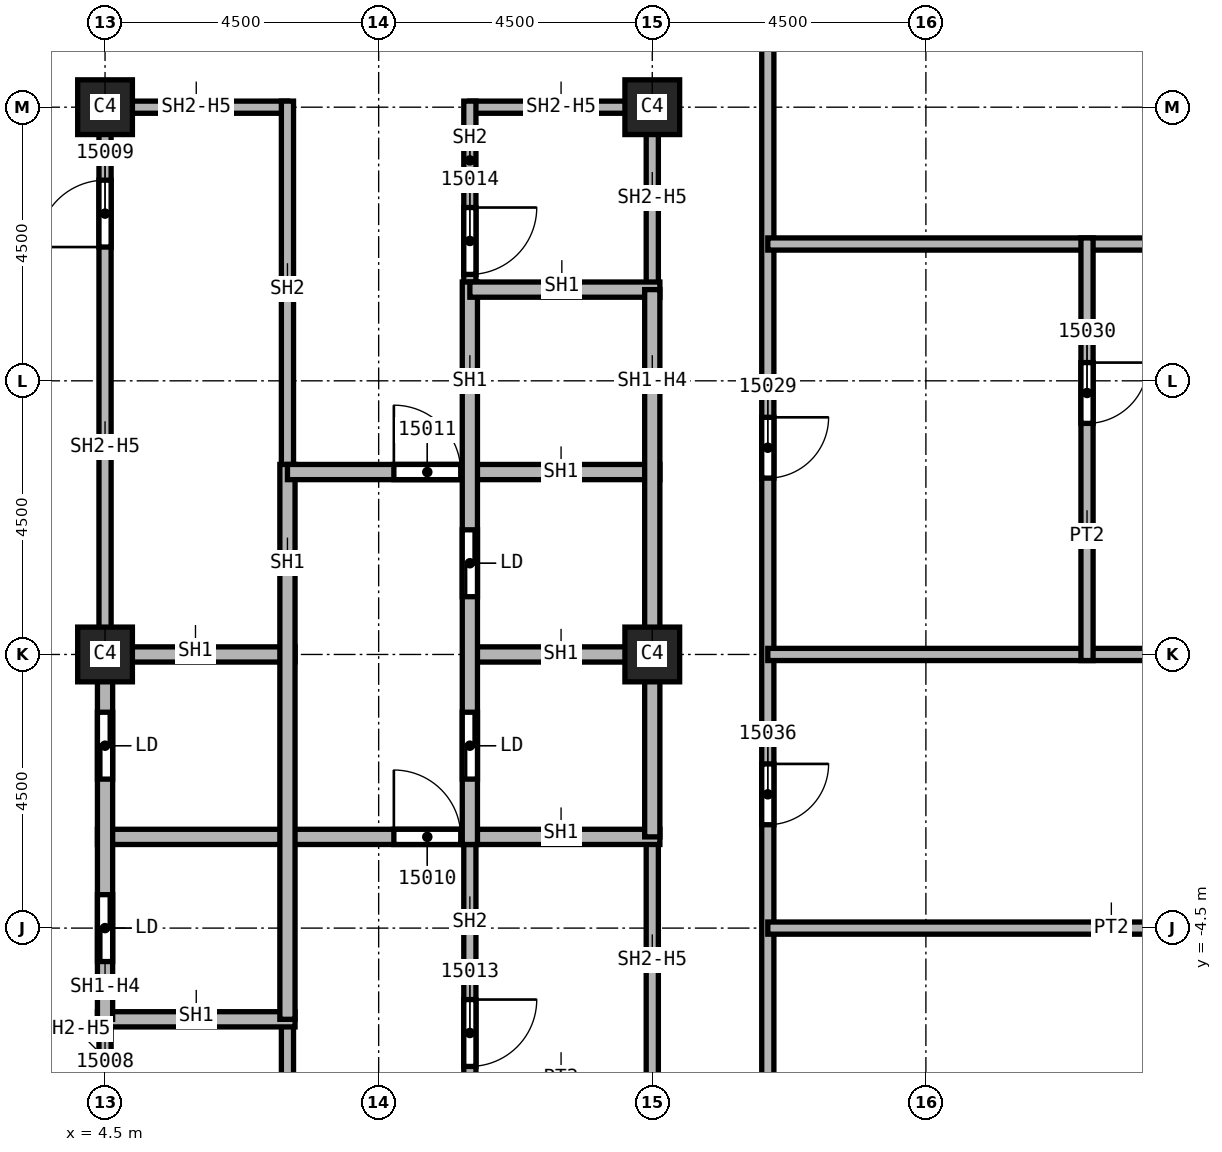
"""IFC4 building model, lengths in metres.
Left out: names, types, materials, properties, quantities, classifications, styles, units other than length and angle.
Written with IfcOpenShell. Run it as: python <this file> out.ifc"""

import sys

from ifc_helpers import new_model, si_unit, direction, frame, frame_2d, origin, origin_2d, place, context, subcontext, project, spatial, rectangle, extrude, element, fill, save


model = new_model("IFC4")
c1 = context("Model", 3, precision=1e-05, world=origin(), true_north=direction((0.0, 1.0)))
c2 = subcontext(c1, "Body", "Model", "MODEL_VIEW")
j1 = project(units=[si_unit("LENGTHUNIT", "METRE"), si_unit("PLANEANGLEUNIT", "RADIAN")], contexts=[c1])
p1 = place(None, origin())
s1 = spatial("IfcSite", under=j1, at=p1, CompositionType="ELEMENT")
p2 = place(p1, origin())
s2 = spatial("IfcBuilding", under=s1, at=p2, CompositionType="ELEMENT")
p3 = place(p2, frame((0.0, 0.0, 232.0)))
s3 = spatial("IfcBuildingStorey", under=s2, at=p3, CompositionType="ELEMENT", Elevation=232.0)
for number, where, z_axis, x_axis in (
    (1, (4.5, 0.0, 0.0), (0.0, 0.0, 1.0), (1.0, 0.0, 0.0)),
    (2, (4.5, 9.0, 0.0), (0.0, 0.0, 1.0), (1.0, 0.0, 0.0)),
    (3, (13.5, 0.0, 0.0), (0.0, 0.0, 1.0), (1.0, 0.0, 0.0)),
    (4, (13.5, 9.0, 0.0), (0.0, 0.0, 1.0), (1.0, 0.0, 0.0)),
):
    element("IfcColumn", number, at=place(p3, frame(where, z_axis=z_axis, x_axis=x_axis)), inside=s3, PredefinedType="COLUMN", context=c2, shape_type="SweptSolid", body=[
        extrude(rectangle(XDim=0.9, YDim=0.9, at=origin_2d()), origin(), (0.0, 0.0, 1.0), 3.6),
    ])
p4 = place(p3, frame((15.4, 22.4, 0.0), z_axis=(0.0, 0.0, 1.0), x_axis=(0.0, -1.0, 0.0)))
e5 = element("IfcWall", 5, at=p4, inside=s3, PredefinedType="PARTITIONING", context=c2, shape_type="SweptSolid", body=[
    extrude(rectangle(XDim=44.8, YDim=0.2, at=frame_2d((22.4, 0.0))), origin(), (0.0, 0.0, 1.0), 3.6),
])
p5 = place(p4, frame((18.5, 0.0, 0.0)))
e6 = element("IfcOpeningElement", 6, at=p5, cuts=e5, PredefinedType="OPENING", context=c2, shape_type="SweptSolid", body=[
    extrude(rectangle(XDim=1.0, YDim=2.1, at=frame_2d((0.5, 1.05))), frame((0.0, 0.1, 0.0), z_axis=(0.0, -1.0, 0.0), x_axis=(1.0, 0.0, 0.0)), (0.0, 0.0, 1.0), 0.2),
])
p6 = place(p4, frame((9.95, 0.0, 0.0)))
e7 = element("IfcOpeningElement", 7, at=p6, cuts=e5, PredefinedType="OPENING", context=c2, shape_type="SweptSolid", body=[
    extrude(rectangle(XDim=1.0, YDim=2.1, at=frame_2d((0.5, 1.05))), frame((0.0, 0.1, 0.0), z_axis=(0.0, -1.0, 0.0), x_axis=(1.0, 0.0, 0.0)), (0.0, 0.0, 1.0), 0.2),
])
p7 = place(p4, frame((1.3, 0.0, 0.0)))
e8 = element("IfcOpeningElement", 8, at=p7, cuts=e5, PredefinedType="OPENING", context=c2, shape_type="SweptSolid", body=[
    extrude(rectangle(XDim=1.0, YDim=2.1, at=frame_2d((0.5, 1.05))), frame((0.0, 0.1, 0.0), z_axis=(0.0, -1.0, 0.0), x_axis=(1.0, 0.0, 0.0)), (0.0, 0.0, 1.0), 0.2),
])
p8 = place(p4, frame((43.55, 0.0, 0.0)))
e9 = element("IfcOpeningElement", 9, at=p8, cuts=e5, PredefinedType="OPENING", context=c2, shape_type="SweptSolid", body=[
    extrude(rectangle(XDim=1.0, YDim=2.1, at=frame_2d((0.5, 1.05))), frame((0.0, 0.1, 0.0), z_axis=(0.0, -1.0, 0.0), x_axis=(1.0, 0.0, 0.0)), (0.0, 0.0, 1.0), 0.2),
])
p9 = place(p4, frame((38.3, 0.0, 0.0)))
e10 = element("IfcOpeningElement", 10, at=p9, cuts=e5, PredefinedType="OPENING", context=c2, shape_type="SweptSolid", body=[
    extrude(rectangle(XDim=1.0, YDim=2.1, at=frame_2d((0.5, 1.05))), frame((0.0, 0.1, 0.0), z_axis=(0.0, -1.0, 0.0), x_axis=(1.0, 0.0, 0.0)), (0.0, 0.0, 1.0), 0.2),
])
p10 = place(p4, frame((30.65, 0.0, 0.0)))
e11 = element("IfcOpeningElement", 11, at=p10, cuts=e5, PredefinedType="OPENING", context=c2, shape_type="SweptSolid", body=[
    extrude(rectangle(XDim=1.0, YDim=2.1, at=frame_2d((0.5, 1.05))), frame((0.0, 0.1, 0.0), z_axis=(0.0, -1.0, 0.0), x_axis=(1.0, 0.0, 0.0)), (0.0, 0.0, 1.0), 0.2),
])
p11 = place(p4, frame((24.2, 0.0, 0.0)))
e12 = element("IfcOpeningElement", 12, at=p11, cuts=e5, PredefinedType="OPENING", context=c2, shape_type="SweptSolid", body=[
    extrude(rectangle(XDim=1.0, YDim=2.1, at=frame_2d((0.5, 1.05))), frame((0.0, 0.1, 0.0), z_axis=(0.0, -1.0, 0.0), x_axis=(1.0, 0.0, 0.0)), (0.0, 0.0, 1.0), 0.2),
])
for number, where, z_axis, x_axis in (
    (13, (15.4, -4.5, 0.0), (0.0, 0.0, 1.0), (1.0, 0.0, 0.0)),
    (14, (15.4, 6.75, 0.0), (0.0, 0.0, 1.0), (1.0, 0.0, 0.0)),
):
    element("IfcWall", number, at=place(p3, frame(where, z_axis=z_axis, x_axis=x_axis)), inside=s3, PredefinedType="PARTITIONING", context=c2, shape_type="SweptSolid", body=[
        extrude(rectangle(XDim=11.2, YDim=0.2, at=frame_2d((5.6, 0.0))), origin(), (0.0, 0.0, 1.0), 3.6),
    ])
p12 = place(p3, frame((26.5, 0.0, 0.0), z_axis=(0.0, 0.0, 1.0), x_axis=(-1.0, 0.0, 0.0)))
e15 = element("IfcWall", 15, at=p12, inside=s3, PredefinedType="PARTITIONING", context=c2, shape_type="SweptSolid", body=[
    extrude(rectangle(XDim=11.1, YDim=0.2, at=frame_2d((5.55, 0.0))), origin(), (0.0, 0.0, 1.0), 3.6),
])
p13 = place(p3, frame((20.65, 6.85, 0.0), z_axis=(0.0, 0.0, 1.0), x_axis=(0.0, -1.0, 0.0)))
e16 = element("IfcWall", 16, at=p13, inside=s3, PredefinedType="PARTITIONING", context=c2, shape_type="SweptSolid", body=[
    extrude(rectangle(XDim=6.95, YDim=0.2, at=frame_2d((3.475, 0.0))), origin(), (0.0, 0.0, 1.0), 3.6),
])
p14 = place(p13, frame((2.05, 0.0, 0.0)))
e17 = element("IfcOpeningElement", 17, at=p14, cuts=e16, PredefinedType="OPENING", context=c2, shape_type="SweptSolid", body=[
    extrude(rectangle(XDim=1.0, YDim=2.1, at=frame_2d((0.5, 1.05))), frame((0.0, 0.1, 0.0), z_axis=(0.0, -1.0, 0.0), x_axis=(1.0, 0.0, 0.0)), (0.0, 0.0, 1.0), 0.2),
])
p15 = place(p3, frame((4.5, -9.1, 0.0), z_axis=(0.0, 0.0, 1.0), x_axis=(0.0, 1.0, 0.0)))
e18 = element("IfcWall", 18, at=p15, inside=s3, PredefinedType="SOLIDWALL", context=c2, shape_type="SweptSolid", body=[
    extrude(rectangle(XDim=3.1, YDim=0.2, at=frame_2d((1.55, 0.0))), origin(), (0.0, 0.0, 1.0), 2.838),
])
p16 = place(p15, frame((0.85, 0.0, 0.0)))
e19 = element("IfcOpeningElement", 19, at=p16, cuts=e18, PredefinedType="OPENING", context=c2, shape_type="SweptSolid", body=[
    extrude(rectangle(XDim=1.1, YDim=2.1, at=frame_2d((0.55, 1.05))), frame((0.0, 0.1, 0.0), z_axis=(0.0, -1.0, 0.0), x_axis=(1.0, 0.0, 0.0)), (0.0, 0.0, 1.0), 0.2),
])
p17 = place(p3, frame((4.5, 0.0, 0.0), z_axis=(0.0, 0.0, 1.0), x_axis=(0.0, 1.0, 0.0)))
e20 = element("IfcWall", 20, at=p17, inside=s3, PredefinedType="SOLIDWALL", context=c2, shape_type="SweptSolid", body=[
    extrude(rectangle(XDim=9.1, YDim=0.2, at=frame_2d((4.55, 0.0))), origin(), (0.0, 0.0, 1.0), 2.838),
])
p18 = place(p17, frame((6.7, 0.0, 0.0)))
e21 = element("IfcOpeningElement", 21, at=p18, cuts=e20, PredefinedType="OPENING", context=c2, shape_type="SweptSolid", body=[
    extrude(rectangle(XDim=1.1, YDim=2.1, at=frame_2d((0.55, 1.05))), frame((0.0, 0.1, 0.0), z_axis=(0.0, -1.0, 0.0), x_axis=(1.0, 0.0, 0.0)), (0.0, 0.0, 1.0), 0.2),
])
p19 = place(p3, frame((4.5, 9.0, 0.0), z_axis=(0.0, 0.0, 1.0), x_axis=(1.0, 0.0, 0.0)))
e22 = element("IfcWall", 22, at=p19, inside=s3, PredefinedType="SOLIDWALL", context=c2, shape_type="SweptSolid", body=[
    extrude(rectangle(XDim=3.0, YDim=0.2, at=frame_2d((1.5, 0.0))), origin(), (0.0, 0.0, 1.0), 2.838),
])
p20 = place(p3, frame((7.5, -6.0, 0.0), z_axis=(0.0, 0.0, 1.0), x_axis=(0.0, -1.0, 0.0)))
e23 = element("IfcWall", 23, at=p20, inside=s3, PredefinedType="SOLIDWALL", context=c2, shape_type="SweptSolid", body=[
    extrude(rectangle(XDim=3.1, YDim=0.2, at=frame_2d((1.55, 0.0))), origin(), (0.0, 0.0, 1.0), 3.6),
])
p21 = place(p3, frame((7.5, 9.1, 0.0), z_axis=(0.0, 0.0, 1.0), x_axis=(0.0, -1.0, 0.0)))
e24 = element("IfcWall", 24, at=p21, inside=s3, PredefinedType="SOLIDWALL", context=c2, shape_type="SweptSolid", body=[
    extrude(rectangle(XDim=6.225, YDim=0.2, at=frame_2d((3.113, 0.0))), origin(), (0.0, 0.0, 1.0), 3.6),
])
p22 = place(p3, frame((10.5, -2.875, 0.0), z_axis=(0.0, 0.0, 1.0), x_axis=(0.0, -1.0, 0.0)))
e25 = element("IfcWall", 25, at=p22, inside=s3, PredefinedType="SOLIDWALL", context=c2, shape_type="SweptSolid", body=[
    extrude(rectangle(XDim=4.2, YDim=0.2, at=frame_2d((2.1, 0.0))), origin(), (0.0, 0.0, 1.0), 3.6),
])
p23 = place(p22, frame((2.8, 0.0, 0.0)))
e26 = element("IfcOpeningElement", 26, at=p23, cuts=e25, PredefinedType="OPENING", context=c2, shape_type="SweptSolid", body=[
    extrude(rectangle(XDim=1.1, YDim=2.1, at=frame_2d((0.55, 1.05))), frame((0.0, 0.1, 0.0), z_axis=(0.0, -1.0, 0.0), x_axis=(1.0, 0.0, 0.0)), (0.0, 0.0, 1.0), 0.2),
])
p24 = place(p3, frame((10.5, 9.0, 0.0), z_axis=(0.0, 0.0, 1.0), x_axis=(1.0, 0.0, 0.0)))
e27 = element("IfcWall", 27, at=p24, inside=s3, PredefinedType="SOLIDWALL", context=c2, shape_type="SweptSolid", body=[
    extrude(rectangle(XDim=3.0, YDim=0.2, at=frame_2d((1.5, 0.0))), origin(), (0.0, 0.0, 1.0), 2.838),
])
p25 = place(p3, frame((10.5, 9.1, 0.0), z_axis=(0.0, 0.0, 1.0), x_axis=(0.0, -1.0, 0.0)))
e28 = element("IfcWall", 28, at=p25, inside=s3, PredefinedType="SOLIDWALL", context=c2, shape_type="SweptSolid", body=[
    extrude(rectangle(XDim=3.225, YDim=0.2, at=frame_2d((1.613, 0.0))), origin(), (0.0, 0.0, 1.0), 3.6),
])
p26 = place(p25, frame((1.75, 0.0, 0.0)))
e29 = element("IfcOpeningElement", 29, at=p26, cuts=e28, PredefinedType="OPENING", context=c2, shape_type="SweptSolid", body=[
    extrude(rectangle(XDim=1.1, YDim=2.1, at=frame_2d((0.55, 1.05))), frame((0.0, 0.1, 0.0), z_axis=(0.0, -1.0, 0.0), x_axis=(1.0, 0.0, 0.0)), (0.0, 0.0, 1.0), 0.2),
])
p27 = place(p3, frame((13.5, -3.0, 0.0), z_axis=(0.0, 0.0, 1.0), x_axis=(0.0, -1.0, 0.0)))
e30 = element("IfcWall", 30, at=p27, inside=s3, PredefinedType="SOLIDWALL", context=c2, shape_type="SweptSolid", body=[
    extrude(rectangle(XDim=4.0, YDim=0.2, at=frame_2d((2.0, 0.0))), origin(), (0.0, 0.0, 1.0), 2.838),
])
p28 = place(p3, frame((13.5, 9.1, 0.0), z_axis=(0.0, 0.0, 1.0), x_axis=(0.0, -1.0, 0.0)))
e31 = element("IfcWall", 31, at=p28, inside=s3, PredefinedType="SOLIDWALL", context=c2, shape_type="SweptSolid", body=[
    extrude(rectangle(XDim=3.1, YDim=0.2, at=frame_2d((1.55, 0.0))), origin(), (0.0, 0.0, 1.0), 2.838),
])
p29 = place(p3, frame((4.375, -6.0, 0.0), z_axis=(0.0, 0.0, 1.0), x_axis=(1.0, 0.0, 0.0)))
e32 = element("IfcWall", 32, at=p29, inside=s3, PredefinedType="SOLIDWALL", context=c2, shape_type="SweptSolid", body=[
    extrude(rectangle(XDim=3.25, YDim=0.25, at=frame_2d((1.625, 0.0))), origin(), (0.0, 0.0, 1.0), 3.6),
])
p30 = place(p3, frame((4.375, -3.0, 0.0), z_axis=(0.0, 0.0, 1.0), x_axis=(1.0, 0.0, 0.0)))
e33 = element("IfcWall", 33, at=p30, inside=s3, PredefinedType="SOLIDWALL", context=c2, shape_type="SweptSolid", body=[
    extrude(rectangle(XDim=9.25, YDim=0.25, at=frame_2d((4.625, 0.0))), origin(), (0.0, 0.0, 1.0), 3.6),
])
p31 = place(p30, frame((4.875, 0.0, 0.0)))
e34 = element("IfcOpeningElement", 34, at=p31, cuts=e33, PredefinedType="OPENING", context=c2, shape_type="SweptSolid", body=[
    extrude(rectangle(XDim=1.1, YDim=2.1, at=frame_2d((0.55, 1.05))), frame((0.0, 0.125, 0.0), z_axis=(0.0, -1.0, 0.0), x_axis=(1.0, 0.0, 0.0)), (0.0, 0.0, 1.0), 0.25),
])
p32 = place(p3, frame((4.375, 0.0, 0.0), z_axis=(0.0, 0.0, 1.0), x_axis=(1.0, 0.0, 0.0)))
e35 = element("IfcWall", 35, at=p32, inside=s3, PredefinedType="SOLIDWALL", context=c2, shape_type="SweptSolid", body=[
    extrude(rectangle(XDim=3.25, YDim=0.25, at=frame_2d((1.625, 0.0))), origin(), (0.0, 0.0, 1.0), 3.6),
])
p33 = place(p3, frame((4.5, -6.0, 0.0), z_axis=(0.0, 0.0, 1.0), x_axis=(0.0, 1.0, 0.0)))
e36 = element("IfcWall", 36, at=p33, inside=s3, PredefinedType="SOLIDWALL", context=c2, shape_type="SweptSolid", body=[
    extrude(rectangle(XDim=6.0, YDim=0.25, at=frame_2d((3.0, 0.0))), origin(), (0.0, 0.0, 1.0), 2.838),
])
p34 = place(p33, frame((0.95, 0.0, 0.0)))
e37 = element("IfcOpeningElement", 37, at=p34, cuts=e36, PredefinedType="OPENING", context=c2, shape_type="SweptSolid", body=[
    extrude(rectangle(XDim=1.1, YDim=2.1, at=frame_2d((0.55, 1.05))), frame((0.0, 0.125, 0.0), z_axis=(0.0, -1.0, 0.0), x_axis=(1.0, 0.0, 0.0)), (0.0, 0.0, 1.0), 0.25),
])
p35 = place(p33, frame((3.95, 0.0, 0.0)))
e38 = element("IfcOpeningElement", 38, at=p35, cuts=e36, PredefinedType="OPENING", context=c2, shape_type="SweptSolid", body=[
    extrude(rectangle(XDim=1.1, YDim=2.1, at=frame_2d((0.55, 1.05))), frame((0.0, 0.125, 0.0), z_axis=(0.0, -1.0, 0.0), x_axis=(1.0, 0.0, 0.0)), (0.0, 0.0, 1.0), 0.25),
])
p36 = place(p3, frame((7.5, 3.125, 0.0), z_axis=(0.0, 0.0, 1.0), x_axis=(0.0, -1.0, 0.0)))
e39 = element("IfcWall", 39, at=p36, inside=s3, PredefinedType="SOLIDWALL", context=c2, shape_type="SweptSolid", body=[
    extrude(rectangle(XDim=9.125, YDim=0.25, at=frame_2d((4.562, 0.0))), origin(), (0.0, 0.0, 1.0), 3.6),
])
p37 = place(p3, frame((7.5, 3.0, 0.0), z_axis=(0.0, 0.0, 1.0), x_axis=(1.0, 0.0, 0.0)))
e40 = element("IfcWall", 40, at=p37, inside=s3, PredefinedType="SOLIDWALL", context=c2, shape_type="SweptSolid", body=[
    extrude(rectangle(XDim=6.125, YDim=0.25, at=frame_2d((3.062, 0.0))), origin(), (0.0, 0.0, 1.0), 3.6),
])
p38 = place(p37, frame((1.75, 0.0, 0.0)))
e41 = element("IfcOpeningElement", 41, at=p38, cuts=e40, PredefinedType="OPENING", context=c2, shape_type="SweptSolid", body=[
    extrude(rectangle(XDim=1.1, YDim=2.1, at=frame_2d((0.55, 1.05))), frame((0.0, 0.125, 0.0), z_axis=(0.0, -1.0, 0.0), x_axis=(1.0, 0.0, 0.0)), (0.0, 0.0, 1.0), 0.25),
])
p39 = place(p3, frame((10.5, 0.0, 0.0), z_axis=(0.0, 0.0, 1.0), x_axis=(1.0, 0.0, 0.0)))
e42 = element("IfcWall", 42, at=p39, inside=s3, PredefinedType="SOLIDWALL", context=c2, shape_type="SweptSolid", body=[
    extrude(rectangle(XDim=3.125, YDim=0.25, at=frame_2d((1.562, 0.0))), origin(), (0.0, 0.0, 1.0), 3.6),
])
p40 = place(p3, frame((10.5, 6.125, 0.0), z_axis=(0.0, 0.0, 1.0), x_axis=(0.0, -1.0, 0.0)))
e43 = element("IfcWall", 43, at=p40, inside=s3, PredefinedType="SOLIDWALL", context=c2, shape_type="SweptSolid", body=[
    extrude(rectangle(XDim=9.25, YDim=0.25, at=frame_2d((4.625, 0.0))), origin(), (0.0, 0.0, 1.0), 3.6),
])
p41 = place(p40, frame((7.075, 0.0, 0.0)))
e44 = element("IfcOpeningElement", 44, at=p41, cuts=e43, PredefinedType="OPENING", context=c2, shape_type="SweptSolid", body=[
    extrude(rectangle(XDim=1.1, YDim=2.1, at=frame_2d((0.55, 1.05))), frame((0.0, 0.125, 0.0), z_axis=(0.0, -1.0, 0.0), x_axis=(1.0, 0.0, 0.0)), (0.0, 0.0, 1.0), 0.25),
])
p42 = place(p40, frame((4.075, 0.0, 0.0)))
e45 = element("IfcOpeningElement", 45, at=p42, cuts=e43, PredefinedType="OPENING", context=c2, shape_type="SweptSolid", body=[
    extrude(rectangle(XDim=1.1, YDim=2.1, at=frame_2d((0.55, 1.05))), frame((0.0, 0.125, 0.0), z_axis=(0.0, -1.0, 0.0), x_axis=(1.0, 0.0, 0.0)), (0.0, 0.0, 1.0), 0.25),
])
p43 = place(p3, frame((10.5, 6.0, 0.0), z_axis=(0.0, 0.0, 1.0), x_axis=(1.0, 0.0, 0.0)))
e46 = element("IfcWall", 46, at=p43, inside=s3, PredefinedType="SOLIDWALL", context=c2, shape_type="SweptSolid", body=[
    extrude(rectangle(XDim=3.125, YDim=0.25, at=frame_2d((1.562, 0.0))), origin(), (0.0, 0.0, 1.0), 3.6),
])
p44 = place(p3, frame((13.5, 6.0, 0.0), z_axis=(0.0, 0.0, 1.0), x_axis=(0.0, -1.0, 0.0)))
e47 = element("IfcWall", 47, at=p44, inside=s3, PredefinedType="SOLIDWALL", context=c2, shape_type="SweptSolid", body=[
    extrude(rectangle(XDim=9.0, YDim=0.25, at=frame_2d((4.5, 0.0))), origin(), (0.0, 0.0, 1.0), 2.838),
])
p45 = place(p18, origin())
e48 = element("IfcDoor", 48, at=p45, inside=s3, OperationType="SINGLE_SWING_RIGHT", PredefinedType="DOOR", context=c2, shape_type="SweptSolid", body=[
    extrude(rectangle(XDim=1.1, YDim=2.1, at=frame_2d((0.55, 1.05))), frame((0.0, 0.025, 0.0), z_axis=(0.0, -1.0, 0.0), x_axis=(1.0, 0.0, 0.0)), (0.0, 0.0, 1.0), 0.05),
])
fill(e21, e48)
p46 = place(p31, origin())
e49 = element("IfcDoor", 49, at=p46, inside=s3, OperationType="SINGLE_SWING_LEFT", PredefinedType="DOOR", context=c2, shape_type="SweptSolid", body=[
    extrude(rectangle(XDim=1.1, YDim=2.1, at=frame_2d((0.55, 1.05))), frame((0.0, 0.025, 0.0), z_axis=(0.0, -1.0, 0.0), x_axis=(1.0, 0.0, 0.0)), (0.0, 0.0, 1.0), 0.05),
])
fill(e34, e49)
p47 = place(p38, origin())
e50 = element("IfcDoor", 50, at=p47, inside=s3, OperationType="SINGLE_SWING_RIGHT", PredefinedType="DOOR", context=c2, shape_type="SweptSolid", body=[
    extrude(rectangle(XDim=1.1, YDim=2.1, at=frame_2d((0.55, 1.05))), frame((0.0, 0.025, 0.0), z_axis=(0.0, -1.0, 0.0), x_axis=(1.0, 0.0, 0.0)), (0.0, 0.0, 1.0), 0.05),
])
fill(e41, e50)
p48 = place(p23, origin())
e51 = element("IfcDoor", 51, at=p48, inside=s3, OperationType="SINGLE_SWING_RIGHT", PredefinedType="DOOR", context=c2, shape_type="SweptSolid", body=[
    extrude(rectangle(XDim=1.1, YDim=2.1, at=frame_2d((0.55, 1.05))), frame((0.0, 0.025, 0.0), z_axis=(0.0, -1.0, 0.0), x_axis=(1.0, 0.0, 0.0)), (0.0, 0.0, 1.0), 0.05),
])
fill(e26, e51)
p49 = place(p26, origin())
e52 = element("IfcDoor", 52, at=p49, inside=s3, OperationType="SINGLE_SWING_LEFT", PredefinedType="DOOR", context=c2, shape_type="SweptSolid", body=[
    extrude(rectangle(XDim=1.1, YDim=2.1, at=frame_2d((0.55, 1.05))), frame((0.0, 0.025, 0.0), z_axis=(0.0, -1.0, 0.0), x_axis=(1.0, 0.0, 0.0)), (0.0, 0.0, 1.0), 0.05),
])
fill(e29, e52)
p50 = place(p5, origin())
e53 = element("IfcDoor", 53, at=p50, inside=s3, OperationType="SINGLE_SWING_RIGHT", PredefinedType="DOOR", context=c2, shape_type="SweptSolid", body=[
    extrude(rectangle(XDim=1.0, YDim=2.1, at=frame_2d((0.5, 1.05))), frame((0.0, 0.025, 0.0), z_axis=(0.0, -1.0, 0.0), x_axis=(1.0, 0.0, 0.0)), (0.0, 0.0, 1.0), 0.05),
])
fill(e6, e53)
p51 = place(p14, origin())
e54 = element("IfcDoor", 54, at=p51, inside=s3, OperationType="SINGLE_SWING_LEFT", PredefinedType="DOOR", context=c2, shape_type="SweptSolid", body=[
    extrude(rectangle(XDim=1.0, YDim=2.1, at=frame_2d((0.5, 1.05))), frame((0.0, 0.025, 0.0), z_axis=(0.0, -1.0, 0.0), x_axis=(1.0, 0.0, 0.0)), (0.0, 0.0, 1.0), 0.05),
])
fill(e17, e54)
p52 = place(p11, origin())
e55 = element("IfcDoor", 55, at=p52, inside=s3, OperationType="SINGLE_SWING_LEFT", PredefinedType="DOOR", context=c2, shape_type="SweptSolid", body=[
    extrude(rectangle(XDim=1.0, YDim=2.1, at=frame_2d((0.5, 1.05))), frame((0.0, 0.025, 0.0), z_axis=(0.0, -1.0, 0.0), x_axis=(1.0, 0.0, 0.0)), (0.0, 0.0, 1.0), 0.05),
])
fill(e12, e55)
p53 = place(p34, origin())
e56 = element("IfcDoor", 56, at=p53, inside=s3, OperationType="SLIDING_TO_LEFT", PredefinedType="DOOR", context=c2, shape_type="SweptSolid", body=[
    extrude(rectangle(XDim=1.1, YDim=2.1, at=frame_2d((0.55, 1.05))), frame((0.0, 0.025, 0.0), z_axis=(0.0, -1.0, 0.0), x_axis=(1.0, 0.0, 0.0)), (0.0, 0.0, 1.0), 0.05),
])
fill(e37, e56)
p54 = place(p35, origin())
e57 = element("IfcDoor", 57, at=p54, inside=s3, OperationType="SLIDING_TO_LEFT", PredefinedType="DOOR", context=c2, shape_type="SweptSolid", body=[
    extrude(rectangle(XDim=1.1, YDim=2.1, at=frame_2d((0.55, 1.05))), frame((0.0, 0.025, 0.0), z_axis=(0.0, -1.0, 0.0), x_axis=(1.0, 0.0, 0.0)), (0.0, 0.0, 1.0), 0.05),
])
fill(e38, e57)
p55 = place(p41, origin())
e58 = element("IfcDoor", 58, at=p55, inside=s3, OperationType="SLIDING_TO_LEFT", PredefinedType="DOOR", context=c2, shape_type="SweptSolid", body=[
    extrude(rectangle(XDim=1.1, YDim=2.1, at=frame_2d((0.55, 1.05))), frame((0.0, 0.025, 0.0), z_axis=(0.0, -1.0, 0.0), x_axis=(1.0, 0.0, 0.0)), (0.0, 0.0, 1.0), 0.05),
])
fill(e44, e58)
p56 = place(p42, origin())
e59 = element("IfcDoor", 59, at=p56, inside=s3, OperationType="SLIDING_TO_LEFT", PredefinedType="DOOR", context=c2, shape_type="SweptSolid", body=[
    extrude(rectangle(XDim=1.1, YDim=2.1, at=frame_2d((0.55, 1.05))), frame((0.0, 0.025, 0.0), z_axis=(0.0, -1.0, 0.0), x_axis=(1.0, 0.0, 0.0)), (0.0, 0.0, 1.0), 0.05),
])
fill(e45, e59)
save(model, sys.argv[1])
